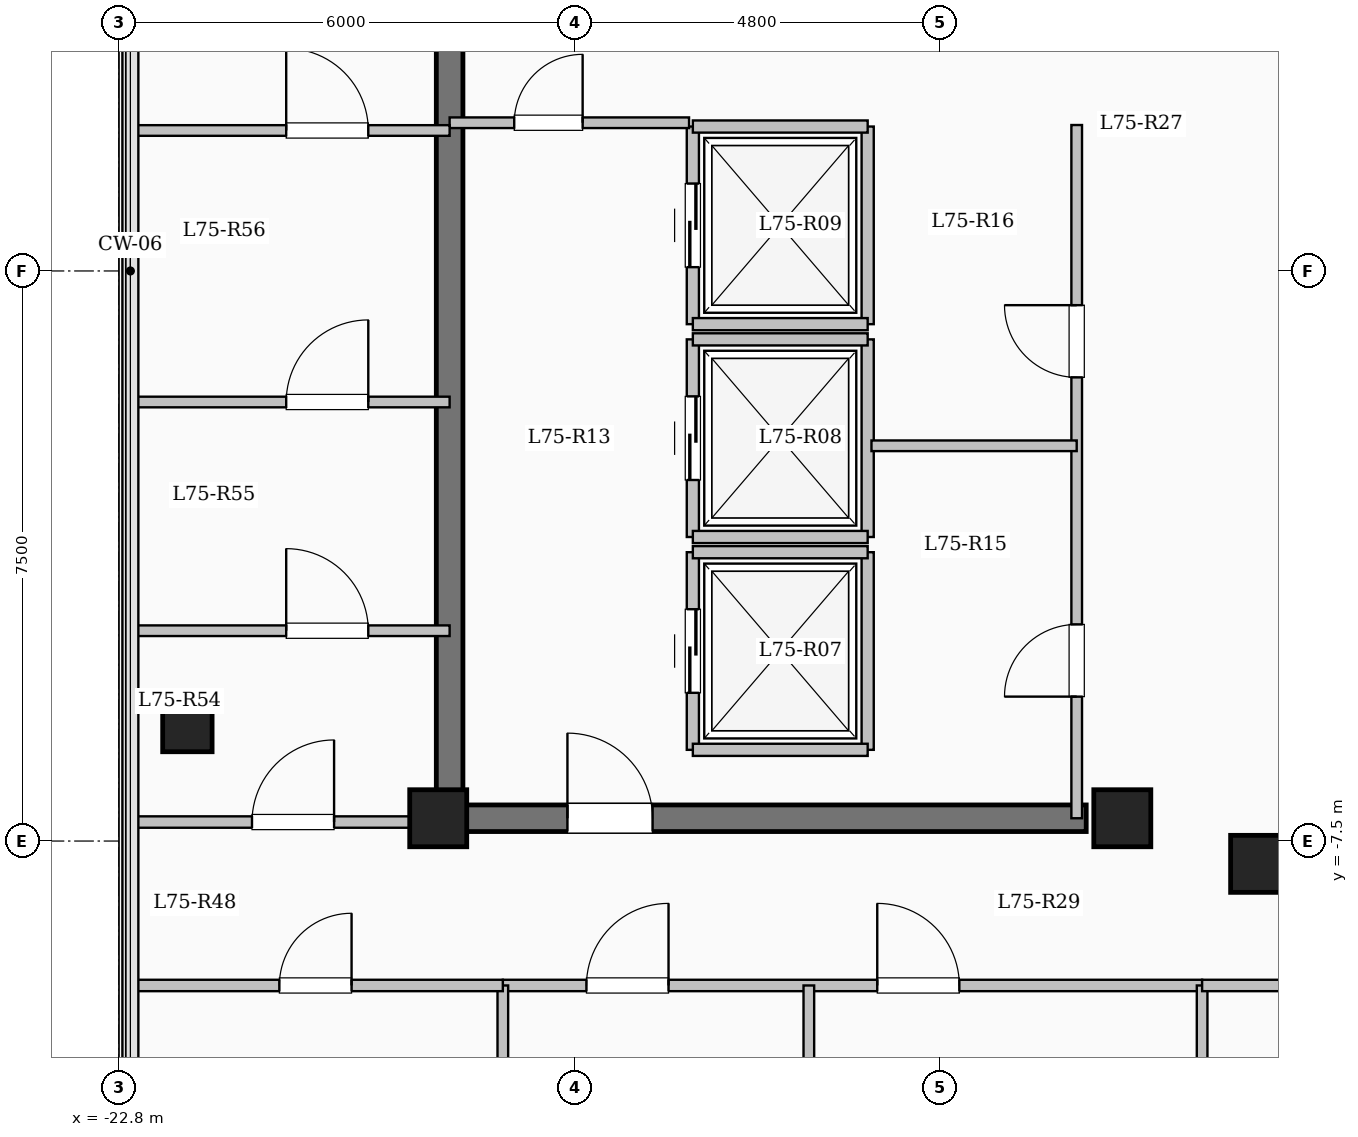
"""IFC4 building model, lengths in metres.
Left out: names, types, materials, properties, quantities, classifications, styles, units other than length and angle.
Written with IfcOpenShell. Run it as: python <this file> out.ifc"""

import sys

from ifc_helpers import new_model, si_unit, direction, frame, frame_2d, origin, origin_2d, place, context, subcontext, project, spatial, rectangle, extrude, element, fill, save


model = new_model("IFC4")
c1 = context("Model", 3, precision=1e-05, world=origin(), true_north=direction((0.0, 1.0)))
c2 = subcontext(c1, "Body", "Model", "MODEL_VIEW")
j1 = project(units=[si_unit("LENGTHUNIT", "METRE"), si_unit("PLANEANGLEUNIT", "RADIAN")], contexts=[c1])
p1 = place(None, origin())
s1 = spatial("IfcSite", under=j1, at=p1, CompositionType="ELEMENT")
p2 = place(p1, origin())
s2 = spatial("IfcBuilding", under=s1, at=p2, CompositionType="ELEMENT")
p3 = place(p2, frame((0.0, 0.0, 276.3)))
s3 = spatial("IfcBuildingStorey", under=s2, at=p3, CompositionType="ELEMENT", Elevation=276.3)
for number, where, z_axis, x_axis in (
    (1, (-7.8, -7.8, 0.0), (0.0, 0.0, 1.0), (1.0, 0.0, 0.0)),
    (2, (-9.6, -7.2, 0.0), (0.0, 0.0, 1.0), (1.0, 0.0, 0.0)),
    (3, (-18.6, -7.2, 0.0), (0.0, 0.0, 1.0), (1.0, 0.0, 0.0)),
):
    element("IfcColumn", number, at=place(p3, frame(where, z_axis=z_axis, x_axis=x_axis)), inside=s3, PredefinedType="COLUMN", context=c2, shape_type="SweptSolid", body=[
        extrude(rectangle(XDim=0.75, YDim=0.75, at=origin_2d()), origin(), (0.0, 0.0, 1.0), 5.25),
    ])
p4 = place(p3, frame((-21.9, -6.0, 0.0), z_axis=(0.0, 0.0, 1.0), x_axis=(1.0, 0.0, 0.0)))
e4 = element("IfcColumn", 4, at=p4, inside=s3, PredefinedType="COLUMN", context=c2, shape_type="SweptSolid", body=[
    extrude(rectangle(XDim=0.65, YDim=0.65, at=origin_2d()), origin(), (0.0, 0.0, 1.0), 5.25),
])
p5 = place(p3, frame((-15.25, -6.3, 0.0), z_axis=(0.0, 0.0, 1.0), x_axis=(0.0, 1.0, 0.0)))
e5 = element("IfcWall", 5, at=p5, inside=s3, PredefinedType="SOLIDWALL", context=c2, shape_type="SweptSolid", body=[
    extrude(rectangle(XDim=2.6, YDim=0.16, at=frame_2d((1.3, 0.0))), origin(), (0.0, 0.0, 1.0), 4.95),
])
p6 = place(p5, frame((0.75, 0.0, 0.0)))
e6 = element("IfcOpeningElement", 6, at=p6, cuts=e5, PredefinedType="OPENING", context=c2, shape_type="SweptSolid", body=[
    extrude(rectangle(XDim=1.1, YDim=2.15, at=frame_2d((0.55, 1.075))), frame((0.0, 0.09, 0.0), z_axis=(0.0, -1.0, 0.0), x_axis=(1.0, 0.0, 0.0)), (0.0, 0.0, 1.0), 0.18),
])
p7 = place(p3, frame((-12.95, -6.3, 0.0), z_axis=(0.0, 0.0, 1.0), x_axis=(0.0, 1.0, 0.0)))
e7 = element("IfcWall", 7, at=p7, inside=s3, PredefinedType="SOLIDWALL", context=c2, shape_type="SweptSolid", body=[
    extrude(rectangle(XDim=2.6, YDim=0.16, at=frame_2d((1.3, 0.0))), origin(), (0.0, 0.0, 1.0), 4.95),
])
for number, where, z_axis, x_axis in (
    (8, (-15.25, -6.3, 0.0), (0.0, 0.0, 1.0), (1.0, 0.0, 0.0)),
    (9, (-15.25, -3.7, 0.0), (0.0, 0.0, 1.0), (1.0, 0.0, 0.0)),
):
    element("IfcWall", number, at=place(p3, frame(where, z_axis=z_axis, x_axis=x_axis)), inside=s3, PredefinedType="SOLIDWALL", context=c2, shape_type="SweptSolid", body=[
        extrude(rectangle(XDim=2.3, YDim=0.16, at=frame_2d((1.15, 0.0))), origin(), (0.0, 0.0, 1.0), 4.95),
    ])
p8 = place(p3, frame((-15.25, -3.5, 0.0), z_axis=(0.0, 0.0, 1.0), x_axis=(0.0, 1.0, 0.0)))
e10 = element("IfcWall", 10, at=p8, inside=s3, PredefinedType="SOLIDWALL", context=c2, shape_type="SweptSolid", body=[
    extrude(rectangle(XDim=2.6, YDim=0.16, at=frame_2d((1.3, 0.0))), origin(), (0.0, 0.0, 1.0), 4.95),
])
p9 = place(p8, frame((0.75, 0.0, 0.0)))
e11 = element("IfcOpeningElement", 11, at=p9, cuts=e10, PredefinedType="OPENING", context=c2, shape_type="SweptSolid", body=[
    extrude(rectangle(XDim=1.1, YDim=2.15, at=frame_2d((0.55, 1.075))), frame((0.0, 0.09, 0.0), z_axis=(0.0, -1.0, 0.0), x_axis=(1.0, 0.0, 0.0)), (0.0, 0.0, 1.0), 0.18),
])
p10 = place(p3, frame((-12.95, -3.5, 0.0), z_axis=(0.0, 0.0, 1.0), x_axis=(0.0, 1.0, 0.0)))
e12 = element("IfcWall", 12, at=p10, inside=s3, PredefinedType="SOLIDWALL", context=c2, shape_type="SweptSolid", body=[
    extrude(rectangle(XDim=2.6, YDim=0.16, at=frame_2d((1.3, 0.0))), origin(), (0.0, 0.0, 1.0), 4.95),
])
for number, where, z_axis, x_axis in (
    (13, (-15.25, -3.5, 0.0), (0.0, 0.0, 1.0), (1.0, 0.0, 0.0)),
    (14, (-15.25, -0.9, 0.0), (0.0, 0.0, 1.0), (1.0, 0.0, 0.0)),
):
    element("IfcWall", number, at=place(p3, frame(where, z_axis=z_axis, x_axis=x_axis)), inside=s3, PredefinedType="SOLIDWALL", context=c2, shape_type="SweptSolid", body=[
        extrude(rectangle(XDim=2.3, YDim=0.16, at=frame_2d((1.15, 0.0))), origin(), (0.0, 0.0, 1.0), 4.95),
    ])
p11 = place(p3, frame((-15.25, -0.7, 0.0), z_axis=(0.0, 0.0, 1.0), x_axis=(0.0, 1.0, 0.0)))
e15 = element("IfcWall", 15, at=p11, inside=s3, PredefinedType="SOLIDWALL", context=c2, shape_type="SweptSolid", body=[
    extrude(rectangle(XDim=2.6, YDim=0.16, at=frame_2d((1.3, 0.0))), origin(), (0.0, 0.0, 1.0), 4.95),
])
p12 = place(p11, frame((0.75, 0.0, 0.0)))
e16 = element("IfcOpeningElement", 16, at=p12, cuts=e15, PredefinedType="OPENING", context=c2, shape_type="SweptSolid", body=[
    extrude(rectangle(XDim=1.1, YDim=2.15, at=frame_2d((0.55, 1.075))), frame((0.0, 0.09, 0.0), z_axis=(0.0, -1.0, 0.0), x_axis=(1.0, 0.0, 0.0)), (0.0, 0.0, 1.0), 0.18),
])
p13 = place(p3, frame((-12.95, -0.7, 0.0), z_axis=(0.0, 0.0, 1.0), x_axis=(0.0, 1.0, 0.0)))
e17 = element("IfcWall", 17, at=p13, inside=s3, PredefinedType="SOLIDWALL", context=c2, shape_type="SweptSolid", body=[
    extrude(rectangle(XDim=2.6, YDim=0.16, at=frame_2d((1.3, 0.0))), origin(), (0.0, 0.0, 1.0), 4.95),
])
for number, where, z_axis, x_axis in (
    (18, (-15.25, -0.7, 0.0), (0.0, 0.0, 1.0), (1.0, 0.0, 0.0)),
    (19, (-15.25, 1.9, 0.0), (0.0, 0.0, 1.0), (1.0, 0.0, 0.0)),
):
    element("IfcWall", number, at=place(p3, frame(where, z_axis=z_axis, x_axis=x_axis)), inside=s3, PredefinedType="SOLIDWALL", context=c2, shape_type="SweptSolid", body=[
        extrude(rectangle(XDim=2.3, YDim=0.16, at=frame_2d((1.15, 0.0))), origin(), (0.0, 0.0, 1.0), 4.95),
    ])
p14 = place(p3, frame((-18.45, -7.375, 0.0), z_axis=(0.0, 0.0, 1.0), x_axis=(0.0, 1.0, 0.0)))
e20 = element("IfcWall", 20, at=p14, inside=s3, PredefinedType="SHEAR", context=c2, shape_type="SweptSolid", body=[
    extrude(rectangle(XDim=14.05, YDim=0.35, at=frame_2d((7.025, 0.0))), origin(), (0.0, 0.0, 1.0), 5.25),
])
p15 = place(p3, frame((-18.625, -7.2, 0.0), z_axis=(0.0, 0.0, 1.0), x_axis=(1.0, 0.0, 0.0)))
e21 = element("IfcWall", 21, at=p15, inside=s3, PredefinedType="SHEAR", context=c2, shape_type="SweptSolid", body=[
    extrude(rectangle(XDim=8.55, YDim=0.35, at=frame_2d((4.275, 0.0))), origin(), (0.0, 0.0, 1.0), 5.25),
])
p16 = place(p15, frame((1.725, 0.0, 0.0)))
e22 = element("IfcOpeningElement", 22, at=p16, cuts=e21, PredefinedType="OPENING", context=c2, shape_type="SweptSolid", body=[
    extrude(rectangle(XDim=1.12, YDim=2.15, at=frame_2d((0.56, 1.075))), frame((0.0, 0.185, 0.0), z_axis=(0.0, -1.0, 0.0), x_axis=(1.0, 0.0, 0.0)), (0.0, 0.0, 1.0), 0.37),
])
p17 = place(p3, frame((-18.45, 1.95, 0.0), z_axis=(0.0, 0.0, 1.0), x_axis=(1.0, 0.0, 0.0)))
e23 = element("IfcWall", 23, at=p17, inside=s3, PredefinedType="PARTITIONING", context=c2, shape_type="SweptSolid", body=[
    extrude(rectangle(XDim=3.15, YDim=0.14, at=frame_2d((1.575, 0.0))), origin(), (0.0, 0.0, 1.0), 4.95),
])
p18 = place(p17, frame((0.85, 0.0, 0.0)))
e24 = element("IfcOpeningElement", 24, at=p18, cuts=e23, PredefinedType="OPENING", context=c2, shape_type="SweptSolid", body=[
    extrude(rectangle(XDim=0.9, YDim=2.08, at=frame_2d((0.45, 1.04))), frame((0.0, 0.08, 0.0), z_axis=(0.0, -1.0, 0.0), x_axis=(1.0, 0.0, 0.0)), (0.0, 0.0, 1.0), 0.16),
])
p19 = place(p3, frame((-10.2, -7.2, 0.0), z_axis=(0.0, 0.0, 1.0), x_axis=(0.0, 1.0, 0.0)))
e25 = element("IfcWall", 25, at=p19, inside=s3, PredefinedType="PARTITIONING", context=c2, shape_type="SweptSolid", body=[
    extrude(rectangle(XDim=9.12, YDim=0.14, at=frame_2d((4.56, 0.0))), origin(), (0.0, 0.0, 1.0), 4.95),
])
p20 = place(p19, frame((1.6, 0.0, 0.0)))
e26 = element("IfcOpeningElement", 26, at=p20, cuts=e25, PredefinedType="OPENING", context=c2, shape_type="SweptSolid", body=[
    extrude(rectangle(XDim=0.95, YDim=2.12, at=frame_2d((0.475, 1.06))), frame((0.0, 0.08, 0.0), z_axis=(0.0, -1.0, 0.0), x_axis=(1.0, 0.0, 0.0)), (0.0, 0.0, 1.0), 0.16),
])
p21 = place(p19, frame((5.8, 0.0, 0.0)))
e27 = element("IfcOpeningElement", 27, at=p21, cuts=e25, PredefinedType="OPENING", context=c2, shape_type="SweptSolid", body=[
    extrude(rectangle(XDim=0.95, YDim=2.12, at=frame_2d((0.475, 1.06))), frame((0.0, 0.08, 0.0), z_axis=(0.0, -1.0, 0.0), x_axis=(1.0, 0.0, 0.0)), (0.0, 0.0, 1.0), 0.16),
])
p22 = place(p3, frame((-12.9, -2.3, 0.0), z_axis=(0.0, 0.0, 1.0), x_axis=(1.0, 0.0, 0.0)))
e28 = element("IfcWall", 28, at=p22, inside=s3, PredefinedType="PARTITIONING", context=c2, shape_type="SweptSolid", body=[
    extrude(rectangle(XDim=2.7, YDim=0.14, at=frame_2d((1.35, 0.0))), origin(), (0.0, 0.0, 1.0), 4.95),
])
p23 = place(p3, frame((-17.75, -9.4, 0.0), z_axis=(0.0, 0.0, 1.0), x_axis=(1.0, 0.0, 0.0)))
e29 = element("IfcWall", 29, at=p23, inside=s3, PredefinedType="PARTITIONING", context=c2, shape_type="SweptSolid", body=[
    extrude(rectangle(XDim=9.2, YDim=0.15, at=frame_2d((4.6, 0.0))), origin(), (0.0, 0.0, 1.0), 4.95),
])
p24 = place(p23, frame((1.1, 0.0, 0.0)))
e30 = element("IfcOpeningElement", 30, at=p24, cuts=e29, PredefinedType="OPENING", context=c2, shape_type="SweptSolid", body=[
    extrude(rectangle(XDim=1.08, YDim=2.15, at=frame_2d((0.54, 1.075))), frame((0.0, 0.085, 0.0), z_axis=(0.0, -1.0, 0.0), x_axis=(1.0, 0.0, 0.0)), (0.0, 0.0, 1.0), 0.17),
])
p25 = place(p23, frame((4.926, 0.0, 0.0)))
e31 = element("IfcOpeningElement", 31, at=p25, cuts=e29, PredefinedType="OPENING", context=c2, shape_type="SweptSolid", body=[
    extrude(rectangle(XDim=1.08, YDim=2.15, at=frame_2d((0.54, 1.075))), frame((0.0, 0.085, 0.0), z_axis=(0.0, -1.0, 0.0), x_axis=(1.0, 0.0, 0.0)), (0.0, 0.0, 1.0), 0.17),
])
p26 = place(p3, frame((-13.724, -20.9, 0.0), z_axis=(0.0, 0.0, 1.0), x_axis=(0.0, 1.0, 0.0)))
e32 = element("IfcWall", 32, at=p26, inside=s3, PredefinedType="PARTITIONING", context=c2, shape_type="SweptSolid", body=[
    extrude(rectangle(XDim=11.5, YDim=0.14, at=frame_2d((5.75, 0.0))), origin(), (0.0, 0.0, 1.0), 4.95),
])
p27 = place(p3, frame((-8.55, -21.504, 0.0), z_axis=(0.0, 0.0, 1.0), x_axis=(0.0, 1.0, 0.0)))
e33 = element("IfcWall", 33, at=p27, inside=s3, PredefinedType="PARTITIONING", context=c2, shape_type="SweptSolid", body=[
    extrude(rectangle(XDim=12.104, YDim=0.14, at=frame_2d((6.052, 0.0))), origin(), (0.0, 0.0, 1.0), 4.95),
])
p28 = place(p3, frame((-8.55, -9.4, 0.0), z_axis=(0.0, 0.0, 1.0), x_axis=(1.0, 0.0, 0.0)))
e34 = element("IfcWall", 34, at=p28, inside=s3, PredefinedType="PARTITIONING", context=c2, shape_type="SweptSolid", body=[
    extrude(rectangle(XDim=17.1, YDim=0.15, at=frame_2d((8.55, 0.0))), origin(), (0.0, 0.0, 1.0), 4.95),
])
p29 = place(p28, frame((1.7, 0.0, 0.0)))
e35 = element("IfcOpeningElement", 35, at=p29, cuts=e34, PredefinedType="OPENING", context=c2, shape_type="SweptSolid", body=[
    extrude(rectangle(XDim=1.08, YDim=2.15, at=frame_2d((0.54, 1.075))), frame((0.0, 0.085, 0.0), z_axis=(0.0, -1.0, 0.0), x_axis=(1.0, 0.0, 0.0)), (0.0, 0.0, 1.0), 0.17),
])
p30 = place(p28, frame((10.5, 0.0, 0.0)))
e36 = element("IfcOpeningElement", 36, at=p30, cuts=e34, PredefinedType="OPENING", context=c2, shape_type="SweptSolid", body=[
    extrude(rectangle(XDim=1.08, YDim=2.15, at=frame_2d((0.54, 1.075))), frame((0.0, 0.085, 0.0), z_axis=(0.0, -1.0, 0.0), x_axis=(1.0, 0.0, 0.0)), (0.0, 0.0, 1.0), 0.17),
])
p31 = place(p3, frame((-22.68, -7.25, 0.0), z_axis=(0.0, 0.0, 1.0), x_axis=(1.0, 0.0, 0.0)))
e37 = element("IfcWall", 37, at=p31, inside=s3, PredefinedType="PARTITIONING", context=c2, shape_type="SweptSolid", body=[
    extrude(rectangle(XDim=4.23, YDim=0.15, at=frame_2d((2.115, 0.0))), origin(), (0.0, 0.0, 1.0), 4.95),
])
p32 = place(p31, frame((1.63, 0.0, 0.0)))
e38 = element("IfcOpeningElement", 38, at=p32, cuts=e37, PredefinedType="OPENING", context=c2, shape_type="SweptSolid", body=[
    extrude(rectangle(XDim=1.08, YDim=2.15, at=frame_2d((0.54, 1.075))), frame((0.0, 0.085, 0.0), z_axis=(0.0, -1.0, 0.0), x_axis=(1.0, 0.0, 0.0)), (0.0, 0.0, 1.0), 0.17),
])
p33 = place(p3, frame((-17.75, -17.55, 0.0), z_axis=(0.0, 0.0, 1.0), x_axis=(0.0, 1.0, 0.0)))
e39 = element("IfcWall", 39, at=p33, inside=s3, PredefinedType="PARTITIONING", context=c2, shape_type="SweptSolid", body=[
    extrude(rectangle(XDim=8.15, YDim=0.14, at=frame_2d((4.075, 0.0))), origin(), (0.0, 0.0, 1.0), 4.95),
])
p34 = place(p3, frame((-22.68, -9.4, 0.0), z_axis=(0.0, 0.0, 1.0), x_axis=(1.0, 0.0, 0.0)))
e40 = element("IfcWall", 40, at=p34, inside=s3, PredefinedType="PARTITIONING", context=c2, shape_type="SweptSolid", body=[
    extrude(rectangle(XDim=4.93, YDim=0.15, at=frame_2d((2.465, 0.0))), origin(), (0.0, 0.0, 1.0), 4.95),
])
p35 = place(p34, frame((1.99, 0.0, 0.0)))
e41 = element("IfcOpeningElement", 41, at=p35, cuts=e40, PredefinedType="OPENING", context=c2, shape_type="SweptSolid", body=[
    extrude(rectangle(XDim=0.95, YDim=2.15, at=frame_2d((0.475, 1.075))), frame((0.0, 0.085, 0.0), z_axis=(0.0, -1.0, 0.0), x_axis=(1.0, 0.0, 0.0)), (0.0, 0.0, 1.0), 0.17),
])
p36 = place(p3, frame((-22.68, -4.733, 0.0), z_axis=(0.0, 0.0, 1.0), x_axis=(1.0, 0.0, 0.0)))
e42 = element("IfcWall", 42, at=p36, inside=s3, PredefinedType="PARTITIONING", context=c2, shape_type="SweptSolid", body=[
    extrude(rectangle(XDim=4.23, YDim=0.14, at=frame_2d((2.115, 0.0))), origin(), (0.0, 0.0, 1.0), 4.95),
])
p37 = place(p36, frame((2.08, 0.0, 0.0)))
e43 = element("IfcOpeningElement", 43, at=p37, cuts=e42, PredefinedType="OPENING", context=c2, shape_type="SweptSolid", body=[
    extrude(rectangle(XDim=1.08, YDim=2.15, at=frame_2d((0.54, 1.075))), frame((0.0, 0.08, 0.0), z_axis=(0.0, -1.0, 0.0), x_axis=(1.0, 0.0, 0.0)), (0.0, 0.0, 1.0), 0.16),
])
p38 = place(p3, frame((-22.68, -1.724, 0.0), z_axis=(0.0, 0.0, 1.0), x_axis=(1.0, 0.0, 0.0)))
e44 = element("IfcWall", 44, at=p38, inside=s3, PredefinedType="PARTITIONING", context=c2, shape_type="SweptSolid", body=[
    extrude(rectangle(XDim=4.23, YDim=0.14, at=frame_2d((2.115, 0.0))), origin(), (0.0, 0.0, 1.0), 4.95),
])
p39 = place(p38, frame((2.08, 0.0, 0.0)))
e45 = element("IfcOpeningElement", 45, at=p39, cuts=e44, PredefinedType="OPENING", context=c2, shape_type="SweptSolid", body=[
    extrude(rectangle(XDim=1.08, YDim=2.15, at=frame_2d((0.54, 1.075))), frame((0.0, 0.08, 0.0), z_axis=(0.0, -1.0, 0.0), x_axis=(1.0, 0.0, 0.0)), (0.0, 0.0, 1.0), 0.16),
])
p40 = place(p3, frame((-22.68, 1.848, 0.0), z_axis=(0.0, 0.0, 1.0), x_axis=(1.0, 0.0, 0.0)))
e46 = element("IfcWall", 46, at=p40, inside=s3, PredefinedType="PARTITIONING", context=c2, shape_type="SweptSolid", body=[
    extrude(rectangle(XDim=4.23, YDim=0.14, at=frame_2d((2.115, 0.0))), origin(), (0.0, 0.0, 1.0), 4.95),
])
p41 = place(p40, frame((2.08, 0.0, 0.0)))
e47 = element("IfcOpeningElement", 47, at=p41, cuts=e46, PredefinedType="OPENING", context=c2, shape_type="SweptSolid", body=[
    extrude(rectangle(XDim=1.08, YDim=2.15, at=frame_2d((0.54, 1.075))), frame((0.0, 0.08, 0.0), z_axis=(0.0, -1.0, 0.0), x_axis=(1.0, 0.0, 0.0)), (0.0, 0.0, 1.0), 0.16),
])
p42 = place(p6, origin())
e48 = element("IfcDoor", 48, at=p42, inside=s3, OperationType="SLIDING_TO_LEFT", PredefinedType="DOOR", context=c2, shape_type="SweptSolid", body=[
    extrude(rectangle(XDim=1.1, YDim=2.15, at=frame_2d((0.55, 1.075))), frame((0.0, 0.025, 0.0), z_axis=(0.0, -1.0, 0.0), x_axis=(1.0, 0.0, 0.0)), (0.0, 0.0, 1.0), 0.05),
])
fill(e6, e48)
p43 = place(p9, origin())
e49 = element("IfcDoor", 49, at=p43, inside=s3, OperationType="SLIDING_TO_LEFT", PredefinedType="DOOR", context=c2, shape_type="SweptSolid", body=[
    extrude(rectangle(XDim=1.1, YDim=2.15, at=frame_2d((0.55, 1.075))), frame((0.0, 0.025, 0.0), z_axis=(0.0, -1.0, 0.0), x_axis=(1.0, 0.0, 0.0)), (0.0, 0.0, 1.0), 0.05),
])
fill(e11, e49)
p44 = place(p12, origin())
e50 = element("IfcDoor", 50, at=p44, inside=s3, OperationType="SLIDING_TO_LEFT", PredefinedType="DOOR", context=c2, shape_type="SweptSolid", body=[
    extrude(rectangle(XDim=1.1, YDim=2.15, at=frame_2d((0.55, 1.075))), frame((0.0, 0.025, 0.0), z_axis=(0.0, -1.0, 0.0), x_axis=(1.0, 0.0, 0.0)), (0.0, 0.0, 1.0), 0.05),
])
fill(e16, e50)
p45 = place(p16, origin())
e51 = element("IfcDoor", 51, at=p45, inside=s3, OperationType="SINGLE_SWING_LEFT", PredefinedType="DOOR", context=c2, shape_type="SweptSolid", body=[
    extrude(rectangle(XDim=1.12, YDim=2.15, at=frame_2d((0.56, 1.075))), frame((0.0, 0.025, 0.0), z_axis=(0.0, -1.0, 0.0), x_axis=(1.0, 0.0, 0.0)), (0.0, 0.0, 1.0), 0.05),
])
fill(e22, e51)
p46 = place(p18, origin())
e52 = element("IfcDoor", 52, at=p46, inside=s3, OperationType="SINGLE_SWING_RIGHT", PredefinedType="DOOR", context=c2, shape_type="SweptSolid", body=[
    extrude(rectangle(XDim=0.9, YDim=2.08, at=frame_2d((0.45, 1.04))), frame((0.0, 0.025, 0.0), z_axis=(0.0, -1.0, 0.0), x_axis=(1.0, 0.0, 0.0)), (0.0, 0.0, 1.0), 0.05),
])
fill(e24, e52)
p47 = place(p20, origin())
e53 = element("IfcDoor", 53, at=p47, inside=s3, OperationType="SINGLE_SWING_LEFT", PredefinedType="DOOR", context=c2, shape_type="SweptSolid", body=[
    extrude(rectangle(XDim=0.95, YDim=2.12, at=frame_2d((0.475, 1.06))), frame((0.0, 0.025, 0.0), z_axis=(0.0, -1.0, 0.0), x_axis=(1.0, 0.0, 0.0)), (0.0, 0.0, 1.0), 0.05),
])
fill(e26, e53)
p48 = place(p21, origin())
e54 = element("IfcDoor", 54, at=p48, inside=s3, OperationType="SINGLE_SWING_RIGHT", PredefinedType="DOOR", context=c2, shape_type="SweptSolid", body=[
    extrude(rectangle(XDim=0.95, YDim=2.12, at=frame_2d((0.475, 1.06))), frame((0.0, 0.025, 0.0), z_axis=(0.0, -1.0, 0.0), x_axis=(1.0, 0.0, 0.0)), (0.0, 0.0, 1.0), 0.05),
])
fill(e27, e54)
p49 = place(p24, origin())
e55 = element("IfcDoor", 55, at=p49, inside=s3, OperationType="SINGLE_SWING_RIGHT", PredefinedType="DOOR", context=c2, shape_type="SweptSolid", body=[
    extrude(rectangle(XDim=1.08, YDim=2.15, at=frame_2d((0.54, 1.075))), frame((0.0, 0.025, 0.0), z_axis=(0.0, -1.0, 0.0), x_axis=(1.0, 0.0, 0.0)), (0.0, 0.0, 1.0), 0.05),
])
fill(e30, e55)
p50 = place(p25, origin())
e56 = element("IfcDoor", 56, at=p50, inside=s3, OperationType="SINGLE_SWING_LEFT", PredefinedType="DOOR", context=c2, shape_type="SweptSolid", body=[
    extrude(rectangle(XDim=1.08, YDim=2.15, at=frame_2d((0.54, 1.075))), frame((0.0, 0.025, 0.0), z_axis=(0.0, -1.0, 0.0), x_axis=(1.0, 0.0, 0.0)), (0.0, 0.0, 1.0), 0.05),
])
fill(e31, e56)
p51 = place(p35, origin())
e57 = element("IfcDoor", 57, at=p51, inside=s3, OperationType="SINGLE_SWING_RIGHT", PredefinedType="DOOR", context=c2, shape_type="SweptSolid", body=[
    extrude(rectangle(XDim=0.95, YDim=2.15, at=frame_2d((0.475, 1.075))), frame((0.0, 0.025, 0.0), z_axis=(0.0, -1.0, 0.0), x_axis=(1.0, 0.0, 0.0)), (0.0, 0.0, 1.0), 0.05),
])
fill(e41, e57)
p52 = place(p32, origin())
e58 = element("IfcDoor", 58, at=p52, inside=s3, OperationType="SINGLE_SWING_RIGHT", PredefinedType="DOOR", context=c2, shape_type="SweptSolid", body=[
    extrude(rectangle(XDim=1.08, YDim=2.15, at=frame_2d((0.54, 1.075))), frame((0.0, 0.025, 0.0), z_axis=(0.0, -1.0, 0.0), x_axis=(1.0, 0.0, 0.0)), (0.0, 0.0, 1.0), 0.05),
])
fill(e38, e58)
p53 = place(p37, origin())
e59 = element("IfcDoor", 59, at=p53, inside=s3, OperationType="SINGLE_SWING_LEFT", PredefinedType="DOOR", context=c2, shape_type="SweptSolid", body=[
    extrude(rectangle(XDim=1.08, YDim=2.15, at=frame_2d((0.54, 1.075))), frame((0.0, 0.025, 0.0), z_axis=(0.0, -1.0, 0.0), x_axis=(1.0, 0.0, 0.0)), (0.0, 0.0, 1.0), 0.05),
])
fill(e43, e59)
p54 = place(p39, origin())
e60 = element("IfcDoor", 60, at=p54, inside=s3, OperationType="SINGLE_SWING_RIGHT", PredefinedType="DOOR", context=c2, shape_type="SweptSolid", body=[
    extrude(rectangle(XDim=1.08, YDim=2.15, at=frame_2d((0.54, 1.075))), frame((0.0, 0.025, 0.0), z_axis=(0.0, -1.0, 0.0), x_axis=(1.0, 0.0, 0.0)), (0.0, 0.0, 1.0), 0.05),
])
fill(e45, e60)
p55 = place(p41, origin())
e61 = element("IfcDoor", 61, at=p55, inside=s3, OperationType="SINGLE_SWING_LEFT", PredefinedType="DOOR", context=c2, shape_type="SweptSolid", body=[
    extrude(rectangle(XDim=1.08, YDim=2.15, at=frame_2d((0.54, 1.075))), frame((0.0, 0.025, 0.0), z_axis=(0.0, -1.0, 0.0), x_axis=(1.0, 0.0, 0.0)), (0.0, 0.0, 1.0), 0.05),
])
fill(e47, e61)
save(model, sys.argv[1])
